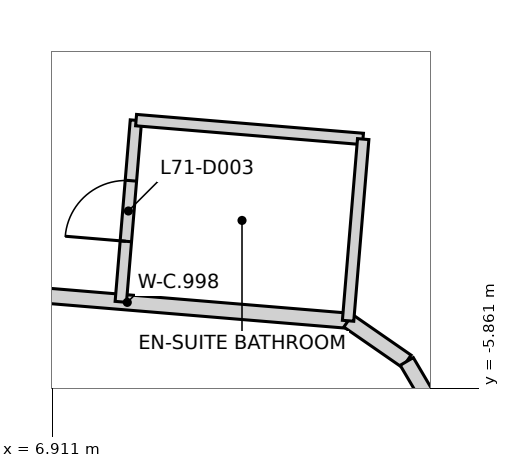
"""IFC4 building model, lengths in metres.
Left out: names, types, materials, properties, quantities, classifications, styles, units other than length and angle.
Written with IfcOpenShell. Run it as: python <this file> out.ifc"""

import sys

from ifc_helpers import new_model, si_unit, direction, frame, frame_2d, origin, place, context, subcontext, project, spatial, rectangle, extrude, element, fill, save


model = new_model("IFC4")
c1 = context("Model", 3, precision=1e-05, world=origin(), true_north=direction((0.0, 1.0)))
c2 = subcontext(c1, "Body", "Model", "MODEL_VIEW")
j1 = project(units=[si_unit("LENGTHUNIT", "METRE"), si_unit("PLANEANGLEUNIT", "RADIAN")], contexts=[c1])
p1 = place(None, origin())
s1 = spatial("IfcSite", under=j1, at=p1, CompositionType="ELEMENT")
p2 = place(p1, origin())
s2 = spatial("IfcBuilding", under=s1, at=p2, CompositionType="ELEMENT")
p3 = place(p2, frame((0.0, 0.0, 280.2)))
s3 = spatial("IfcBuildingStorey", under=s2, at=p3, CompositionType="ELEMENT", Elevation=280.2)
p4 = place(p3, frame((4.988, -4.487, 0.0), z_axis=(0.0, 0.0, 1.0), x_axis=(0.996576293439, -0.08267823992, 0.0)))
e1 = element("IfcWall", 1, at=p4, inside=s3, PredefinedType="PARTITIONING", context=c2, shape_type="SweptSolid", body=[
    extrude(rectangle(XDim=5.832, YDim=0.2, at=frame_2d((2.916, 0.0))), origin(), (0.0, 0.0, 1.0), 3.25),
])
p5 = place(p4, frame((0.2, 0.0, 0.0)))
e2 = element("IfcOpeningElement", 2, at=p5, cuts=e1, PredefinedType="OPENING", context=c2, shape_type="SweptSolid", body=[
    extrude(rectangle(XDim=0.95, YDim=2.1, at=frame_2d((0.475, 1.05))), frame((0.0, 0.11, 0.0), z_axis=(0.0, -1.0, 0.0), x_axis=(1.0, 0.0, 0.0)), (0.0, 0.0, 1.0), 0.22),
])
p6 = place(p3, frame((10.8, -4.97, 0.0), z_axis=(0.0, 0.0, 1.0), x_axis=(0.822107837165, -0.569331804902, 0.0)))
e3 = element("IfcWall", 3, at=p6, inside=s3, PredefinedType="PARTITIONING", context=c2, shape_type="SweptSolid", body=[
    extrude(rectangle(XDim=0.938, YDim=0.2, at=frame_2d((0.469, 0.0))), origin(), (0.0, 0.0, 1.0), 3.25),
])
p7 = place(p3, frame((11.571, -5.505, 0.0), z_axis=(0.0, 0.0, 1.0), x_axis=(0.507321116571, -0.86175709146, 0.0)))
e4 = element("IfcWall", 4, at=p7, inside=s3, PredefinedType="PARTITIONING", context=c2, shape_type="SweptSolid", body=[
    extrude(rectangle(XDim=1.63, YDim=0.2, at=frame_2d((0.815, 0.0))), origin(), (0.0, 0.0, 1.0), 3.25),
])
p8 = place(p3, frame((7.809, -4.721, 0.0), z_axis=(0.0, 0.0, 1.0), x_axis=(0.08303704791, 0.996546460871, 0.0)))
e5 = element("IfcWall", 5, at=p8, inside=s3, PredefinedType="PARTITIONING", context=c2, shape_type="SweptSolid", body=[
    extrude(rectangle(XDim=2.396, YDim=0.15, at=frame_2d((1.198, 0.0))), origin(), (0.0, 0.0, 1.0), 3.25),
])
p9 = place(p8, frame((0.8, 0.0, 0.0)))
e6 = element("IfcOpeningElement", 6, at=p9, cuts=e5, PredefinedType="OPENING", context=c2, shape_type="SweptSolid", body=[
    extrude(rectangle(XDim=0.8, YDim=2.1, at=frame_2d((0.4, 1.05))), frame((0.0, 0.085, 0.0), z_axis=(0.0, -1.0, 0.0), x_axis=(1.0, 0.0, 0.0)), (0.0, 0.0, 1.0), 0.17),
])
p10 = place(p3, frame((8.01, -2.33, 0.0), z_axis=(0.0, 0.0, 1.0), x_axis=(0.996572126957, -0.082728445969, 0.0)))
e7 = element("IfcWall", 7, at=p10, inside=s3, PredefinedType="PARTITIONING", context=c2, shape_type="SweptSolid", body=[
    extrude(rectangle(XDim=2.995, YDim=0.15, at=frame_2d((1.498, 0.0))), origin(), (0.0, 0.0, 1.0), 3.25),
])
p11 = place(p3, frame((10.799, -4.97, 0.0), z_axis=(0.0, 0.0, 1.0), x_axis=(0.08296965374, 0.996552074183, 0.0)))
e8 = element("IfcWall", 8, at=p11, inside=s3, PredefinedType="PARTITIONING", context=c2, shape_type="SweptSolid", body=[
    extrude(rectangle(XDim=2.398, YDim=0.15, at=frame_2d((1.199, 0.0))), origin(), (0.0, 0.0, 1.0), 3.25),
])
p12 = place(p9, frame((0.8, 0.0, 0.0), z_axis=(0.0, 0.0, 1.0), x_axis=(-1.0, 0.0, 0.0)))
e9 = element("IfcDoor", 9, at=p12, inside=s3, OperationType="SINGLE_SWING_LEFT", PredefinedType="DOOR", context=c2, shape_type="SweptSolid", body=[
    extrude(rectangle(XDim=0.8, YDim=2.1, at=frame_2d((0.4, 1.05))), frame((0.0, 0.025, 0.0), z_axis=(0.0, -1.0, 0.0), x_axis=(1.0, 0.0, 0.0)), (0.0, 0.0, 1.0), 0.05),
])
fill(e6, e9)
save(model, sys.argv[1])
